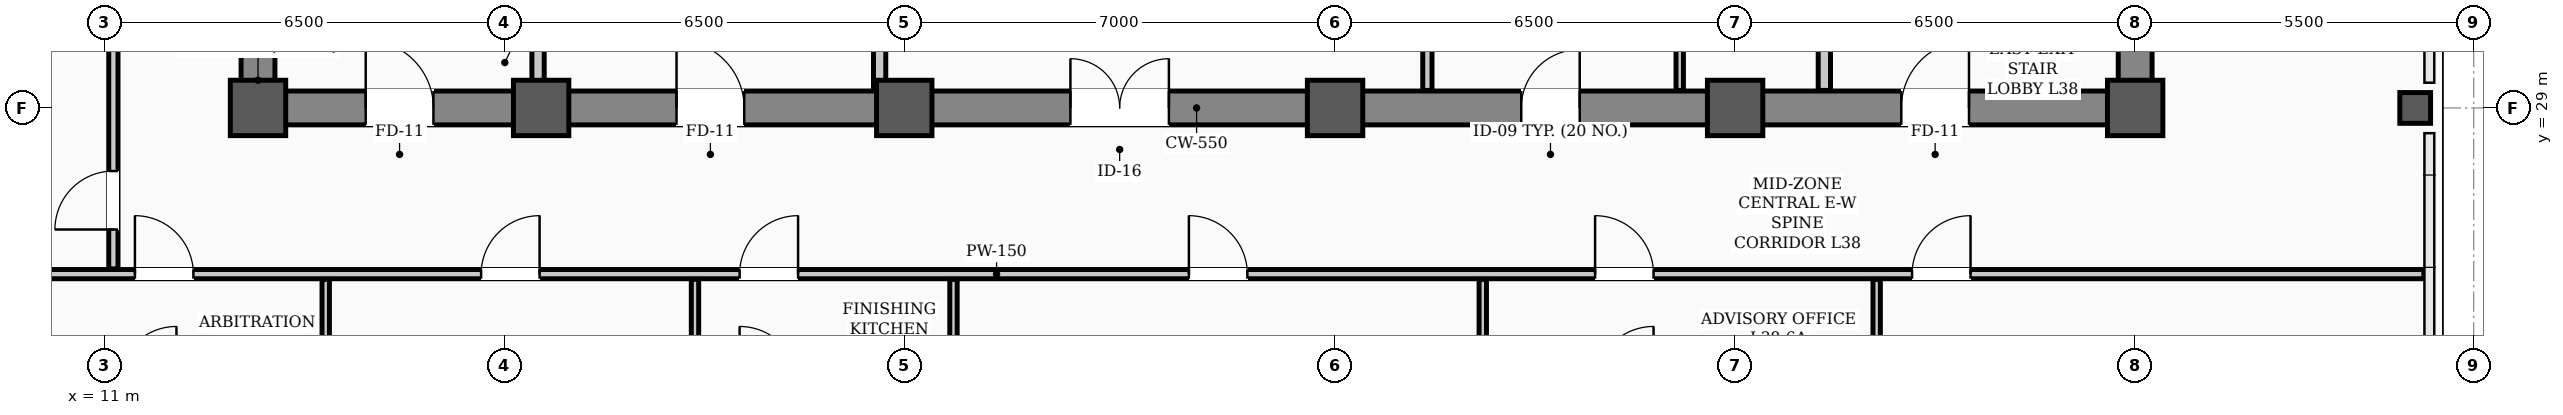
"""IFC4 building model, lengths in metres.
Left out: names, types, materials, properties, quantities, classifications, styles, units other than length and angle.
Written with IfcOpenShell. Run it as: python <this file> out.ifc"""

import sys

from ifc_helpers import new_model, si_unit, direction, frame, frame_2d, origin, origin_2d, place, context, subcontext, project, spatial, rectangle, hollow_rectangle, extrude, element, fill, save


model = new_model("IFC4")
c1 = context("Model", 3, precision=1e-05, world=origin(), true_north=direction((0.0, 1.0)))
c2 = subcontext(c1, "Body", "Model", "MODEL_VIEW")
j1 = project(units=[si_unit("LENGTHUNIT", "METRE"), si_unit("PLANEANGLEUNIT", "RADIAN")], contexts=[c1])
p1 = place(None, origin())
s1 = spatial("IfcSite", under=j1, at=p1, CompositionType="ELEMENT")
p2 = place(p1, origin())
s2 = spatial("IfcBuilding", under=s1, at=p2, CompositionType="ELEMENT")
p3 = place(p2, frame((0.0, 0.0, 153.9)))
s3 = spatial("IfcBuildingStorey", under=s2, at=p3, CompositionType="ELEMENT", Elevation=153.9)
for number, where, z_axis, x_axis in (
    (1, (13.5, 29.0, 0.0), (0.0, 0.0, 1.0), (1.0, 0.0, 0.0)),
    (2, (18.1, 29.0, 0.0), (0.0, 0.0, 1.0), (1.0, 0.0, 0.0)),
    (3, (24.0, 29.0, 0.0), (0.0, 0.0, 1.0), (1.0, 0.0, 0.0)),
    (4, (31.0, 29.0, 0.0), (0.0, 0.0, 1.0), (1.0, 0.0, 0.0)),
    (5, (37.5, 29.0, 0.0), (0.0, 0.0, 1.0), (1.0, 0.0, 0.0)),
    (6, (44.0, 29.0, 0.0), (0.0, 0.0, 1.0), (1.0, 0.0, 0.0)),
):
    element("IfcColumn", number, at=place(p3, frame(where, z_axis=z_axis, x_axis=x_axis)), inside=s3, PredefinedType="COLUMN", context=c2, shape_type="SweptSolid", body=[
        extrude(hollow_rectangle(XDim=0.9, YDim=0.9, WallThickness=0.035, InnerFilletRadius=0.017, OuterFilletRadius=0.052, at=origin_2d()), origin(), (0.0, 0.0, 1.0), 3.9),
    ])
p4 = place(p3, frame((48.55, 29.0, 0.0), z_axis=(0.0, 0.0, 1.0), x_axis=(1.0, 0.0, 0.0)))
e7 = element("IfcColumn", 7, at=p4, inside=s3, PredefinedType="COLUMN", context=c2, shape_type="SweptSolid", body=[
    extrude(hollow_rectangle(XDim=0.5, YDim=0.5, WallThickness=0.024, InnerFilletRadius=0.012, OuterFilletRadius=0.036, at=origin_2d()), origin(), (0.0, 0.0, 1.0), 3.9),
])
p5 = place(p3, frame((13.5, 29.0, 0.0), z_axis=(0.0, 0.0, 1.0), x_axis=(1.0, 0.0, 0.0)))
e8 = element("IfcWall", 8, at=p5, inside=s3, PredefinedType="SHEAR", context=c2, shape_type="SweptSolid", body=[
    extrude(rectangle(XDim=30.5, YDim=0.55, at=frame_2d((15.25, 0.0))), origin(), (0.0, 0.0, 1.0), 3.72),
])
p6 = place(p5, frame((1.75, 0.0, 0.0)))
e9 = element("IfcOpeningElement", 9, at=p6, cuts=e8, PredefinedType="OPENING", context=c2, shape_type="SweptSolid", body=[
    extrude(rectangle(XDim=1.1, YDim=2.08, at=frame_2d((0.55, 1.04))), frame((0.0, 0.285, 0.0), z_axis=(0.0, -1.0, 0.0), x_axis=(1.0, 0.0, 0.0)), (0.0, 0.0, 1.0), 0.57),
])
p7 = place(p5, frame((26.7, 0.0, 0.0)))
e10 = element("IfcOpeningElement", 10, at=p7, cuts=e8, PredefinedType="OPENING", context=c2, shape_type="SweptSolid", body=[
    extrude(rectangle(XDim=1.1, YDim=2.08, at=frame_2d((0.55, 1.04))), frame((0.0, 0.285, 0.0), z_axis=(0.0, -1.0, 0.0), x_axis=(1.0, 0.0, 0.0)), (0.0, 0.0, 1.0), 0.57),
])
p8 = place(p5, frame((6.8, 0.0, 0.0)))
e11 = element("IfcOpeningElement", 11, at=p8, cuts=e8, PredefinedType="OPENING", context=c2, shape_type="SweptSolid", body=[
    extrude(rectangle(XDim=1.1, YDim=2.08, at=frame_2d((0.55, 1.04))), frame((0.0, 0.285, 0.0), z_axis=(0.0, -1.0, 0.0), x_axis=(1.0, 0.0, 0.0)), (0.0, 0.0, 1.0), 0.57),
])
p9 = place(p5, frame((13.2, 0.0, 0.0)))
e12 = element("IfcOpeningElement", 12, at=p9, cuts=e8, PredefinedType="OPENING", context=c2, shape_type="SweptSolid", body=[
    extrude(rectangle(XDim=1.6, YDim=2.08, at=frame_2d((0.8, 1.04))), frame((0.0, 0.285, 0.0), z_axis=(0.0, -1.0, 0.0), x_axis=(1.0, 0.0, 0.0)), (0.0, 0.0, 1.0), 0.57),
])
p10 = place(p5, frame((20.525, 0.0, 0.0)))
e13 = element("IfcOpeningElement", 13, at=p10, cuts=e8, PredefinedType="OPENING", context=c2, shape_type="SweptSolid", body=[
    extrude(rectangle(XDim=0.95, YDim=2.08, at=frame_2d((0.475, 1.04))), frame((0.0, 0.285, 0.0), z_axis=(0.0, -1.0, 0.0), x_axis=(1.0, 0.0, 0.0)), (0.0, 0.0, 1.0), 0.57),
])
for number, where, z_axis, x_axis in (
    (14, (13.5, 29.35, 0.0), (0.0, 0.0, 1.0), (0.0, 1.0, 0.0)),
    (15, (44.0, 29.35, 0.0), (0.0, 0.0, 1.0), (0.0, 1.0, 0.0)),
):
    element("IfcWall", number, at=place(p3, frame(where, z_axis=z_axis, x_axis=x_axis)), inside=s3, PredefinedType="SHEAR", context=c2, shape_type="SweptSolid", body=[
        extrude(rectangle(XDim=8.6, YDim=0.55, at=frame_2d((4.3, 0.0))), origin(), (0.0, 0.0, 1.0), 3.72),
    ])
p11 = place(p3, frame((2.31, 26.3, 0.0), z_axis=(0.0, 0.0, 1.0), x_axis=(1.0, 0.0, 0.0)))
e16 = element("IfcWall", 16, at=p11, inside=s3, PredefinedType="PARTITIONING", context=c2, shape_type="SweptSolid", body=[
    extrude(rectangle(XDim=46.38, YDim=0.15, at=frame_2d((23.19, 0.0))), origin(), (0.0, 0.0, 1.0), 3.2),
])
p12 = place(p11, frame((9.19, 0.0, 0.0)))
e17 = element("IfcOpeningElement", 17, at=p12, cuts=e16, PredefinedType="OPENING", context=c2, shape_type="SweptSolid", body=[
    extrude(rectangle(XDim=0.95, YDim=2.08, at=frame_2d((0.475, 1.04))), frame((0.0, 0.085, 0.0), z_axis=(0.0, -1.0, 0.0), x_axis=(1.0, 0.0, 0.0)), (0.0, 0.0, 1.0), 0.17),
])
p13 = place(p11, frame((14.815, 0.0, 0.0)))
e18 = element("IfcOpeningElement", 18, at=p13, cuts=e16, PredefinedType="OPENING", context=c2, shape_type="SweptSolid", body=[
    extrude(rectangle(XDim=0.95, YDim=2.08, at=frame_2d((0.475, 1.04))), frame((0.0, 0.085, 0.0), z_axis=(0.0, -1.0, 0.0), x_axis=(1.0, 0.0, 0.0)), (0.0, 0.0, 1.0), 0.17),
])
p14 = place(p11, frame((19.015, 0.0, 0.0)))
e19 = element("IfcOpeningElement", 19, at=p14, cuts=e16, PredefinedType="OPENING", context=c2, shape_type="SweptSolid", body=[
    extrude(rectangle(XDim=0.95, YDim=2.08, at=frame_2d((0.475, 1.04))), frame((0.0, 0.085, 0.0), z_axis=(0.0, -1.0, 0.0), x_axis=(1.0, 0.0, 0.0)), (0.0, 0.0, 1.0), 0.17),
])
p15 = place(p11, frame((26.315, 0.0, 0.0)))
e20 = element("IfcOpeningElement", 20, at=p15, cuts=e16, PredefinedType="OPENING", context=c2, shape_type="SweptSolid", body=[
    extrude(rectangle(XDim=0.95, YDim=2.08, at=frame_2d((0.475, 1.04))), frame((0.0, 0.085, 0.0), z_axis=(0.0, -1.0, 0.0), x_axis=(1.0, 0.0, 0.0)), (0.0, 0.0, 1.0), 0.17),
])
p16 = place(p11, frame((32.915, 0.0, 0.0)))
e21 = element("IfcOpeningElement", 21, at=p16, cuts=e16, PredefinedType="OPENING", context=c2, shape_type="SweptSolid", body=[
    extrude(rectangle(XDim=0.95, YDim=2.08, at=frame_2d((0.475, 1.04))), frame((0.0, 0.085, 0.0), z_axis=(0.0, -1.0, 0.0), x_axis=(1.0, 0.0, 0.0)), (0.0, 0.0, 1.0), 0.17),
])
p17 = place(p11, frame((38.065, 0.0, 0.0)))
e22 = element("IfcOpeningElement", 22, at=p17, cuts=e16, PredefinedType="OPENING", context=c2, shape_type="SweptSolid", body=[
    extrude(rectangle(XDim=0.95, YDim=2.08, at=frame_2d((0.475, 1.04))), frame((0.0, 0.085, 0.0), z_axis=(0.0, -1.0, 0.0), x_axis=(1.0, 0.0, 0.0)), (0.0, 0.0, 1.0), 0.17),
])
for number, where, z_axis, x_axis in (
    (23, (18.05, 29.285, 0.0), (0.0, 0.0, 1.0), (0.0, 1.0, 0.0)),
    (24, (38.95, 29.285, 0.0), (0.0, 0.0, 1.0), (0.0, 1.0, 0.0)),
):
    element("IfcWall", number, at=place(p3, frame(where, z_axis=z_axis, x_axis=x_axis)), inside=s3, PredefinedType="STANDARD", context=c2, shape_type="SweptSolid", body=[
        extrude(rectangle(XDim=1.015, YDim=0.2, at=frame_2d((0.508, 0.0))), origin(), (0.0, 0.0, 1.0), 3.35),
    ])
p18 = place(p3, frame((23.6, 29.285, 0.0), z_axis=(0.0, 0.0, 1.0), x_axis=(0.0, 1.0, 0.0)))
e25 = element("IfcWall", 25, at=p18, inside=s3, PredefinedType="STANDARD", context=c2, shape_type="SweptSolid", body=[
    extrude(rectangle(XDim=5.415, YDim=0.2, at=frame_2d((2.708, 0.0))), origin(), (0.0, 0.0, 1.0), 3.2),
])
p19 = place(p3, frame((32.5, 29.285, 0.0), z_axis=(0.0, 0.0, 1.0), x_axis=(0.0, 1.0, 0.0)))
e26 = element("IfcWall", 26, at=p19, inside=s3, PredefinedType="PARTITIONING", context=c2, shape_type="SweptSolid", body=[
    extrude(rectangle(XDim=2.48, YDim=0.15, at=frame_2d((1.24, 0.0))), origin(), (0.0, 0.0, 1.0), 3.35),
])
p20 = place(p3, frame((36.6, 29.285, 0.0), z_axis=(0.0, 0.0, 1.0), x_axis=(0.0, 1.0, 0.0)))
e27 = element("IfcWall", 27, at=p20, inside=s3, PredefinedType="PARTITIONING", context=c2, shape_type="SweptSolid", body=[
    extrude(rectangle(XDim=2.48, YDim=0.12, at=frame_2d((1.24, 0.0))), origin(), (0.0, 0.0, 1.0), 3.35),
])
p21 = place(p3, frame((11.15, 26.385, 0.0), z_axis=(0.0, 0.0, 1.0), x_axis=(0.0, 1.0, 0.0)))
e28 = element("IfcWall", 28, at=p21, inside=s3, PredefinedType="PARTITIONING", context=c2, shape_type="SweptSolid", body=[
    extrude(rectangle(XDim=13.58, YDim=0.15, at=frame_2d((6.79, 0.0))), origin(), (0.0, 0.0, 1.0), 3.1),
])
p22 = place(p21, frame((0.64, 0.0, 0.0)))
e29 = element("IfcOpeningElement", 29, at=p22, cuts=e28, PredefinedType="OPENING", context=c2, shape_type="SweptSolid", body=[
    extrude(rectangle(XDim=0.95, YDim=2.08, at=frame_2d((0.475, 1.04))), frame((0.0, 0.085, 0.0), z_axis=(0.0, -1.0, 0.0), x_axis=(1.0, 0.0, 0.0)), (0.0, 0.0, 1.0), 0.17),
])
p23 = place(p21, frame((9.465, 0.0, 0.0)))
e30 = element("IfcOpeningElement", 30, at=p23, cuts=e28, PredefinedType="OPENING", context=c2, shape_type="SweptSolid", body=[
    extrude(rectangle(XDim=0.95, YDim=2.08, at=frame_2d((0.475, 1.04))), frame((0.0, 0.085, 0.0), z_axis=(0.0, -1.0, 0.0), x_axis=(1.0, 0.0, 0.0)), (0.0, 0.0, 1.0), 0.17),
])
for number, where, z_axis, x_axis in (
    (31, (14.6, 16.31, 0.0), (0.0, 0.0, 1.0), (0.0, 1.0, 0.0)),
    (32, (20.6, 16.31, 0.0), (0.0, 0.0, 1.0), (0.0, 1.0, 0.0)),
):
    element("IfcWall", number, at=place(p3, frame(where, z_axis=z_axis, x_axis=x_axis)), inside=s3, PredefinedType="PARTITIONING", context=c2, shape_type="SweptSolid", body=[
        extrude(rectangle(XDim=9.905, YDim=0.12, at=frame_2d((4.953, 0.0))), origin(), (0.0, 0.0, 1.0), 3.1),
    ])
p24 = place(p3, frame((24.8, 18.07, 0.0), z_axis=(0.0, 0.0, 1.0), x_axis=(0.0, 1.0, 0.0)))
e33 = element("IfcWall", 33, at=p24, inside=s3, PredefinedType="PARTITIONING", context=c2, shape_type="SweptSolid", body=[
    extrude(rectangle(XDim=8.145, YDim=0.12, at=frame_2d((4.073, 0.0))), origin(), (0.0, 0.0, 1.0), 3.1),
])
for number, where, z_axis, x_axis in (
    (34, (33.4, 16.31, 0.0), (0.0, 0.0, 1.0), (0.0, 1.0, 0.0)),
    (35, (39.8, 16.31, 0.0), (0.0, 0.0, 1.0), (0.0, 1.0, 0.0)),
):
    element("IfcWall", number, at=place(p3, frame(where, z_axis=z_axis, x_axis=x_axis)), inside=s3, PredefinedType="PARTITIONING", context=c2, shape_type="SweptSolid", body=[
        extrude(rectangle(XDim=9.905, YDim=0.12, at=frame_2d((4.953, 0.0))), origin(), (0.0, 0.0, 1.0), 3.1),
    ])
p25 = place(p6, origin())
e36 = element("IfcDoor", 36, at=p25, inside=s3, OperationType="SINGLE_SWING_LEFT", PredefinedType="DOOR", context=c2, shape_type="SweptSolid", body=[
    extrude(rectangle(XDim=1.1, YDim=2.08, at=frame_2d((0.55, 1.04))), frame((0.0, 0.025, 0.0), z_axis=(0.0, -1.0, 0.0), x_axis=(1.0, 0.0, 0.0)), (0.0, 0.0, 1.0), 0.05),
])
fill(e9, e36)
p26 = place(p7, origin())
e37 = element("IfcDoor", 37, at=p26, inside=s3, OperationType="SINGLE_SWING_RIGHT", PredefinedType="DOOR", context=c2, shape_type="SweptSolid", body=[
    extrude(rectangle(XDim=1.1, YDim=2.08, at=frame_2d((0.55, 1.04))), frame((0.0, 0.025, 0.0), z_axis=(0.0, -1.0, 0.0), x_axis=(1.0, 0.0, 0.0)), (0.0, 0.0, 1.0), 0.05),
])
fill(e10, e37)
p27 = place(p8, origin())
e38 = element("IfcDoor", 38, at=p27, inside=s3, OperationType="SINGLE_SWING_LEFT", PredefinedType="DOOR", context=c2, shape_type="SweptSolid", body=[
    extrude(rectangle(XDim=1.1, YDim=2.08, at=frame_2d((0.55, 1.04))), frame((0.0, 0.025, 0.0), z_axis=(0.0, -1.0, 0.0), x_axis=(1.0, 0.0, 0.0)), (0.0, 0.0, 1.0), 0.05),
])
fill(e11, e38)
p28 = place(p9, origin())
e39 = element("IfcDoor", 39, at=p28, inside=s3, OperationType="DOUBLE_DOOR_SINGLE_SWING", PredefinedType="DOOR", context=c2, shape_type="SweptSolid", body=[
    extrude(rectangle(XDim=1.6, YDim=2.08, at=frame_2d((0.8, 1.04))), frame((0.0, 0.025, 0.0), z_axis=(0.0, -1.0, 0.0), x_axis=(1.0, 0.0, 0.0)), (0.0, 0.0, 1.0), 0.05),
])
fill(e12, e39)
p29 = place(p10, origin())
e40 = element("IfcDoor", 40, at=p29, inside=s3, OperationType="SINGLE_SWING_RIGHT", PredefinedType="DOOR", context=c2, shape_type="SweptSolid", body=[
    extrude(rectangle(XDim=0.95, YDim=2.08, at=frame_2d((0.475, 1.04))), frame((0.0, 0.025, 0.0), z_axis=(0.0, -1.0, 0.0), x_axis=(1.0, 0.0, 0.0)), (0.0, 0.0, 1.0), 0.05),
])
fill(e13, e40)
p30 = place(p12, origin())
e41 = element("IfcDoor", 41, at=p30, inside=s3, OperationType="SINGLE_SWING_LEFT", PredefinedType="DOOR", context=c2, shape_type="SweptSolid", body=[
    extrude(rectangle(XDim=0.95, YDim=2.08, at=frame_2d((0.475, 1.04))), frame((0.0, 0.025, 0.0), z_axis=(0.0, -1.0, 0.0), x_axis=(1.0, 0.0, 0.0)), (0.0, 0.0, 1.0), 0.05),
])
fill(e17, e41)
p31 = place(p13, origin())
e42 = element("IfcDoor", 42, at=p31, inside=s3, OperationType="SINGLE_SWING_RIGHT", PredefinedType="DOOR", context=c2, shape_type="SweptSolid", body=[
    extrude(rectangle(XDim=0.95, YDim=2.08, at=frame_2d((0.475, 1.04))), frame((0.0, 0.025, 0.0), z_axis=(0.0, -1.0, 0.0), x_axis=(1.0, 0.0, 0.0)), (0.0, 0.0, 1.0), 0.05),
])
fill(e18, e42)
p32 = place(p14, origin())
e43 = element("IfcDoor", 43, at=p32, inside=s3, OperationType="SINGLE_SWING_RIGHT", PredefinedType="DOOR", context=c2, shape_type="SweptSolid", body=[
    extrude(rectangle(XDim=0.95, YDim=2.08, at=frame_2d((0.475, 1.04))), frame((0.0, 0.025, 0.0), z_axis=(0.0, -1.0, 0.0), x_axis=(1.0, 0.0, 0.0)), (0.0, 0.0, 1.0), 0.05),
])
fill(e19, e43)
p33 = place(p15, origin())
e44 = element("IfcDoor", 44, at=p33, inside=s3, OperationType="SINGLE_SWING_LEFT", PredefinedType="DOOR", context=c2, shape_type="SweptSolid", body=[
    extrude(rectangle(XDim=0.95, YDim=2.08, at=frame_2d((0.475, 1.04))), frame((0.0, 0.025, 0.0), z_axis=(0.0, -1.0, 0.0), x_axis=(1.0, 0.0, 0.0)), (0.0, 0.0, 1.0), 0.05),
])
fill(e20, e44)
p34 = place(p16, origin())
e45 = element("IfcDoor", 45, at=p34, inside=s3, OperationType="SINGLE_SWING_LEFT", PredefinedType="DOOR", context=c2, shape_type="SweptSolid", body=[
    extrude(rectangle(XDim=0.95, YDim=2.08, at=frame_2d((0.475, 1.04))), frame((0.0, 0.025, 0.0), z_axis=(0.0, -1.0, 0.0), x_axis=(1.0, 0.0, 0.0)), (0.0, 0.0, 1.0), 0.05),
])
fill(e21, e45)
p35 = place(p17, origin())
e46 = element("IfcDoor", 46, at=p35, inside=s3, OperationType="SINGLE_SWING_RIGHT", PredefinedType="DOOR", context=c2, shape_type="SweptSolid", body=[
    extrude(rectangle(XDim=0.95, YDim=2.08, at=frame_2d((0.475, 1.04))), frame((0.0, 0.025, 0.0), z_axis=(0.0, -1.0, 0.0), x_axis=(1.0, 0.0, 0.0)), (0.0, 0.0, 1.0), 0.05),
])
fill(e22, e46)
p36 = place(p22, origin())
e47 = element("IfcDoor", 47, at=p36, inside=s3, OperationType="SINGLE_SWING_LEFT", PredefinedType="DOOR", context=c2, shape_type="SweptSolid", body=[
    extrude(rectangle(XDim=0.95, YDim=2.08, at=frame_2d((0.475, 1.04))), frame((0.0, 0.025, 0.0), z_axis=(0.0, -1.0, 0.0), x_axis=(1.0, 0.0, 0.0)), (0.0, 0.0, 1.0), 0.05),
])
fill(e29, e47)
save(model, sys.argv[1])
